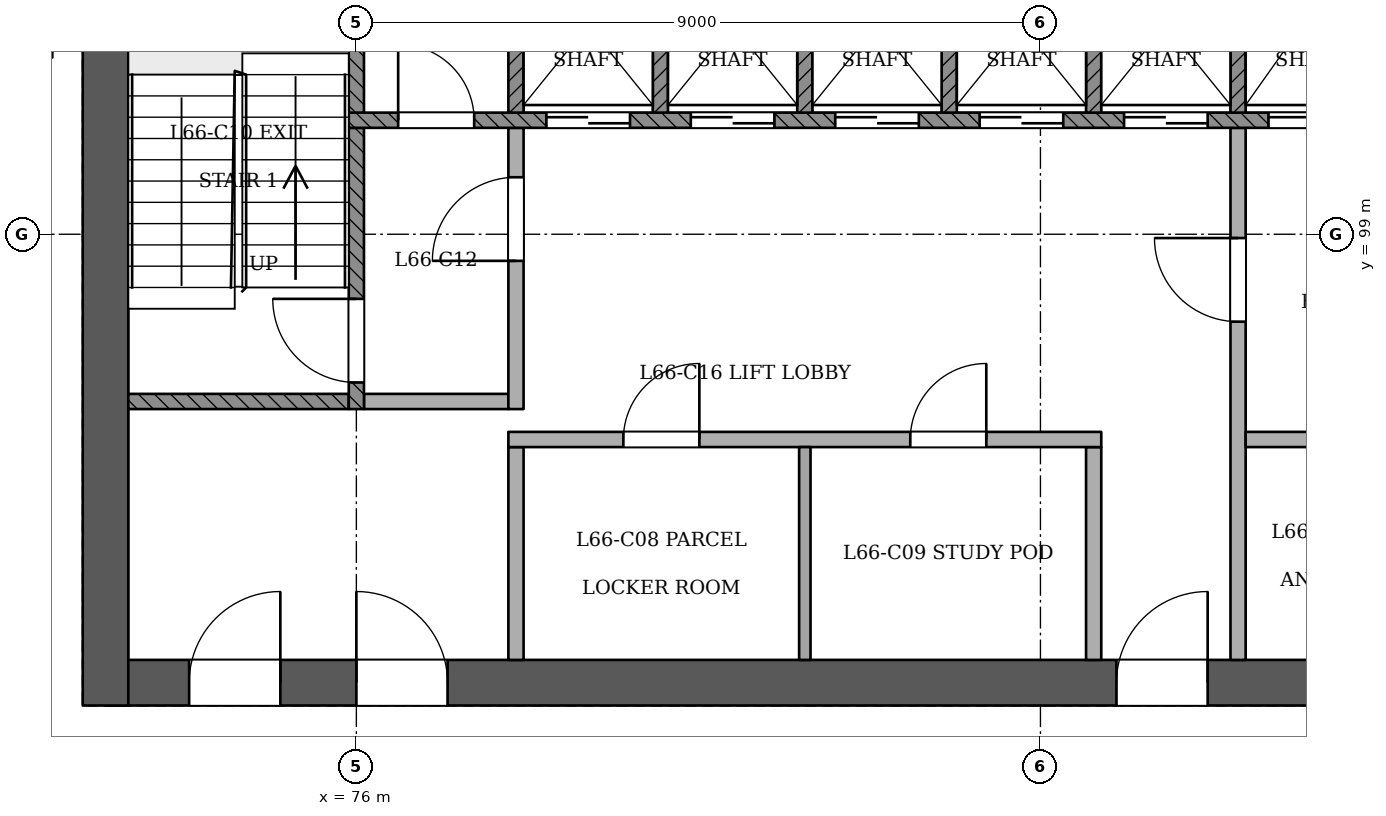
"""IFC4 building model, lengths in metres.
Left out: names, types, materials, properties, quantities, classifications, styles, units other than length and angle.
Written with IfcOpenShell. Run it as: python <this file> out.ifc"""

import sys

from ifc_helpers import new_model, si_unit, direction, frame, frame_2d, origin, place, context, subcontext, project, spatial, rectangle, extrude, element, fill, save


model = new_model("IFC4")
c1 = context("Model", 3, precision=1e-05, world=origin(), true_north=direction((0.0, 1.0)))
c2 = subcontext(c1, "Body", "Model", "MODEL_VIEW")
j1 = project(units=[si_unit("LENGTHUNIT", "METRE"), si_unit("PLANEANGLEUNIT", "RADIAN")], contexts=[c1])
p1 = place(None, origin())
s1 = spatial("IfcSite", under=j1, at=p1, CompositionType="ELEMENT")
p2 = place(p1, origin())
s2 = spatial("IfcBuilding", under=s1, at=p2, CompositionType="ELEMENT")
p3 = place(p2, frame((0.0, 0.0, 257.2)))
s3 = spatial("IfcBuildingStorey", under=s2, at=p3, CompositionType="ELEMENT", Elevation=257.2)
p4 = place(p3, frame((72.7, 93.1, 0.0), z_axis=(0.0, 0.0, 1.0), x_axis=(1.0, 0.0, 0.0)))
e1 = element("IfcWall", 1, at=p4, inside=s3, PredefinedType="SHEAR", context=c2, shape_type="SweptSolid", body=[
    extrude(rectangle(XDim=24.9, YDim=0.6, at=frame_2d((12.45, 0.0))), origin(), (0.0, 0.0, 1.0), 3.6),
])
p5 = place(p4, frame((1.1, 0.0, 0.0)))
e2 = element("IfcOpeningElement", 2, at=p5, cuts=e1, PredefinedType="OPENING", context=c2, shape_type="SweptSolid", body=[
    extrude(rectangle(XDim=1.2, YDim=2.1, at=frame_2d((0.6, 1.05))), frame((0.0, 0.311, 0.0), z_axis=(0.0, -1.0, 0.0), x_axis=(1.0, 0.0, 0.0)), (0.0, 0.0, 1.0), 0.621),
])
p6 = place(p4, frame((3.3, 0.0, 0.0)))
e3 = element("IfcOpeningElement", 3, at=p6, cuts=e1, PredefinedType="OPENING", context=c2, shape_type="SweptSolid", body=[
    extrude(rectangle(XDim=1.2, YDim=2.1, at=frame_2d((0.6, 1.05))), frame((0.0, 0.311, 0.0), z_axis=(0.0, -1.0, 0.0), x_axis=(1.0, 0.0, 0.0)), (0.0, 0.0, 1.0), 0.621),
])
p7 = place(p4, frame((13.3, 0.0, 0.0)))
e4 = element("IfcOpeningElement", 4, at=p7, cuts=e1, PredefinedType="OPENING", context=c2, shape_type="SweptSolid", body=[
    extrude(rectangle(XDim=1.2, YDim=2.1, at=frame_2d((0.6, 1.05))), frame((0.0, 0.311, 0.0), z_axis=(0.0, -1.0, 0.0), x_axis=(1.0, 0.0, 0.0)), (0.0, 0.0, 1.0), 0.621),
])
p8 = place(p4, frame((15.962, 0.0, 0.0)))
e5 = element("IfcOpeningElement", 5, at=p8, cuts=e1, PredefinedType="OPENING", context=c2, shape_type="SweptSolid", body=[
    extrude(rectangle(XDim=1.0, YDim=2.1, at=frame_2d((0.5, 1.05))), frame((0.0, 0.311, 0.0), z_axis=(0.0, -1.0, 0.0), x_axis=(1.0, 0.0, 0.0)), (0.0, 0.0, 1.0), 0.621),
])
p9 = place(p4, frame((18.75, 0.0, 0.0)))
e6 = element("IfcOpeningElement", 6, at=p9, cuts=e1, PredefinedType="OPENING", context=c2, shape_type="SweptSolid", body=[
    extrude(rectangle(XDim=1.0, YDim=2.1, at=frame_2d((0.5, 1.05))), frame((0.0, 0.311, 0.0), z_axis=(0.0, -1.0, 0.0), x_axis=(1.0, 0.0, 0.0)), (0.0, 0.0, 1.0), 0.621),
])
p10 = place(p4, frame((21.938, 0.0, 0.0)))
e7 = element("IfcOpeningElement", 7, at=p10, cuts=e1, PredefinedType="OPENING", context=c2, shape_type="SweptSolid", body=[
    extrude(rectangle(XDim=1.0, YDim=2.1, at=frame_2d((0.5, 1.05))), frame((0.0, 0.311, 0.0), z_axis=(0.0, -1.0, 0.0), x_axis=(1.0, 0.0, 0.0)), (0.0, 0.0, 1.0), 0.621),
])
p11 = place(p3, frame((72.7, 103.7, 0.0), z_axis=(0.0, 0.0, 1.0), x_axis=(0.0, -1.0, 0.0)))
e8 = element("IfcWall", 8, at=p11, inside=s3, PredefinedType="SHEAR", context=c2, shape_type="SweptSolid", body=[
    extrude(rectangle(XDim=10.9, YDim=0.6, at=frame_2d((5.45, 0.0))), origin(), (0.0, 0.0, 1.0), 3.6),
])
p12 = place(p3, frame((72.0, 101.4, 0.0), z_axis=(0.0, 0.0, 1.0), x_axis=(-1.0, 0.0, 0.0)))
e9 = element("IfcWall", 9, at=p12, inside=s3, PredefinedType="PARTITIONING", context=c2, shape_type="SweptSolid", body=[
    extrude(rectangle(XDim=1.8, YDim=0.15, at=frame_2d((0.9, 0.0))), origin(), (0.0, 0.0, 1.0), 3.2),
])
p13 = place(p12, frame((0.496, 0.0, 0.0)))
e10 = element("IfcOpeningElement", 10, at=p13, cuts=e9, PredefinedType="OPENING", context=c2, shape_type="SweptSolid", body=[
    extrude(rectangle(XDim=1.0, YDim=2.1, at=frame_2d((0.5, 1.05))), frame((0.0, 0.085, 0.0), z_axis=(0.0, -1.0, 0.0), x_axis=(1.0, 0.0, 0.0)), (0.0, 0.0, 1.0), 0.171),
])
p14 = place(p3, frame((78.1, 93.4, 0.0), z_axis=(0.0, 0.0, 1.0), x_axis=(0.0, 1.0, 0.0)))
e11 = element("IfcWall", 11, at=p14, inside=s3, PredefinedType="PARTITIONING", context=c2, shape_type="SweptSolid", body=[
    extrude(rectangle(XDim=2.8, YDim=0.2, at=frame_2d((1.4, 0.0))), origin(), (0.0, 0.0, 1.0), 3.2),
])
p15 = place(p3, frame((81.9, 93.4, 0.0), z_axis=(0.0, 0.0, 1.0), x_axis=(0.0, 1.0, 0.0)))
e12 = element("IfcWall", 12, at=p15, inside=s3, PredefinedType="PARTITIONING", context=c2, shape_type="SweptSolid", body=[
    extrude(rectangle(XDim=2.8, YDim=0.15, at=frame_2d((1.4, 0.0))), origin(), (0.0, 0.0, 1.0), 3.2),
])
p16 = place(p3, frame((85.7, 93.4, 0.0), z_axis=(0.0, 0.0, 1.0), x_axis=(0.0, 1.0, 0.0)))
e13 = element("IfcWall", 13, at=p16, inside=s3, PredefinedType="PARTITIONING", context=c2, shape_type="SweptSolid", body=[
    extrude(rectangle(XDim=2.8, YDim=0.2, at=frame_2d((1.4, 0.0))), origin(), (0.0, 0.0, 1.0), 3.2),
])
p17 = place(p3, frame((87.6, 93.4, 0.0), z_axis=(0.0, 0.0, 1.0), x_axis=(0.0, 1.0, 0.0)))
e14 = element("IfcWall", 14, at=p17, inside=s3, PredefinedType="PARTITIONING", context=c2, shape_type="SweptSolid", body=[
    extrude(rectangle(XDim=7.0, YDim=0.2, at=frame_2d((3.5, 0.0))), origin(), (0.0, 0.0, 1.0), 3.2),
])
p18 = place(p17, frame((4.45, 0.0, 0.0)))
e15 = element("IfcOpeningElement", 15, at=p18, cuts=e14, PredefinedType="OPENING", context=c2, shape_type="SweptSolid", body=[
    extrude(rectangle(XDim=1.1, YDim=2.1, at=frame_2d((0.55, 1.05))), frame((0.0, 0.11, 0.0), z_axis=(0.0, -1.0, 0.0), x_axis=(1.0, 0.0, 0.0)), (0.0, 0.0, 1.0), 0.221),
])
p19 = place(p3, frame((78.0, 96.3, 0.0), z_axis=(0.0, 0.0, 1.0), x_axis=(1.0, 0.0, 0.0)))
e16 = element("IfcWall", 16, at=p19, inside=s3, PredefinedType="PARTITIONING", context=c2, shape_type="SweptSolid", body=[
    extrude(rectangle(XDim=7.8, YDim=0.2, at=frame_2d((3.9, 0.0))), origin(), (0.0, 0.0, 1.0), 3.2),
])
p20 = place(p19, frame((1.512, 0.0, 0.0)))
e17 = element("IfcOpeningElement", 17, at=p20, cuts=e16, PredefinedType="OPENING", context=c2, shape_type="SweptSolid", body=[
    extrude(rectangle(XDim=1.0, YDim=2.1, at=frame_2d((0.5, 1.05))), frame((0.0, 0.11, 0.0), z_axis=(0.0, -1.0, 0.0), x_axis=(1.0, 0.0, 0.0)), (0.0, 0.0, 1.0), 0.221),
])
p21 = place(p19, frame((5.288, 0.0, 0.0)))
e18 = element("IfcOpeningElement", 18, at=p21, cuts=e16, PredefinedType="OPENING", context=c2, shape_type="SweptSolid", body=[
    extrude(rectangle(XDim=1.0, YDim=2.1, at=frame_2d((0.5, 1.05))), frame((0.0, 0.11, 0.0), z_axis=(0.0, -1.0, 0.0), x_axis=(1.0, 0.0, 0.0)), (0.0, 0.0, 1.0), 0.221),
])
p22 = place(p3, frame((87.7, 96.3, 0.0), z_axis=(0.0, 0.0, 1.0), x_axis=(1.0, 0.0, 0.0)))
e19 = element("IfcWall", 19, at=p22, inside=s3, PredefinedType="PARTITIONING", context=c2, shape_type="SweptSolid", body=[
    extrude(rectangle(XDim=3.6, YDim=0.2, at=frame_2d((1.8, 0.0))), origin(), (0.0, 0.0, 1.0), 3.2),
])
p23 = place(p3, frame((73.0, 96.8, 0.0), z_axis=(0.0, 0.0, 1.0), x_axis=(1.0, 0.0, 0.0)))
e20 = element("IfcWall", 20, at=p23, inside=s3, PredefinedType="SOLIDWALL", context=c2, shape_type="SweptSolid", body=[
    extrude(rectangle(XDim=2.9, YDim=0.2, at=frame_2d((1.45, 0.0))), origin(), (0.0, 0.0, 1.0), 3.2),
])
p24 = place(p3, frame((76.0, 96.7, 0.0), z_axis=(0.0, 0.0, 1.0), x_axis=(0.0, 1.0, 0.0)))
e21 = element("IfcWall", 21, at=p24, inside=s3, PredefinedType="SOLIDWALL", context=c2, shape_type="SweptSolid", body=[
    extrude(rectangle(XDim=3.7, YDim=0.2, at=frame_2d((1.85, 0.0))), origin(), (0.0, 0.0, 1.0), 3.2),
])
p25 = place(p24, frame((0.35, 0.0, 0.0)))
e22 = element("IfcOpeningElement", 22, at=p25, cuts=e21, PredefinedType="OPENING", context=c2, shape_type="SweptSolid", body=[
    extrude(rectangle(XDim=1.1, YDim=2.1, at=frame_2d((0.55, 1.05))), frame((0.0, 0.11, 0.0), z_axis=(0.0, -1.0, 0.0), x_axis=(1.0, 0.0, 0.0)), (0.0, 0.0, 1.0), 0.221),
])
p26 = place(p3, frame((76.1, 96.8, 0.0), z_axis=(0.0, 0.0, 1.0), x_axis=(1.0, 0.0, 0.0)))
e23 = element("IfcWall", 23, at=p26, inside=s3, PredefinedType="PARTITIONING", context=c2, shape_type="SweptSolid", body=[
    extrude(rectangle(XDim=1.9, YDim=0.2, at=frame_2d((0.95, 0.0))), origin(), (0.0, 0.0, 1.0), 3.2),
])
p27 = place(p3, frame((78.1, 96.7, 0.0), z_axis=(0.0, 0.0, 1.0), x_axis=(0.0, 1.0, 0.0)))
e24 = element("IfcWall", 24, at=p27, inside=s3, PredefinedType="PARTITIONING", context=c2, shape_type="SweptSolid", body=[
    extrude(rectangle(XDim=3.7, YDim=0.2, at=frame_2d((1.85, 0.0))), origin(), (0.0, 0.0, 1.0), 3.2),
])
p28 = place(p27, frame((1.95, 0.0, 0.0)))
e25 = element("IfcOpeningElement", 25, at=p28, cuts=e24, PredefinedType="OPENING", context=c2, shape_type="SweptSolid", body=[
    extrude(rectangle(XDim=1.1, YDim=2.1, at=frame_2d((0.55, 1.05))), frame((0.0, 0.11, 0.0), z_axis=(0.0, -1.0, 0.0), x_axis=(1.0, 0.0, 0.0)), (0.0, 0.0, 1.0), 0.221),
])
p29 = place(p3, frame((75.9, 100.5, 0.0), z_axis=(0.0, 0.0, 1.0), x_axis=(1.0, 0.0, 0.0)))
e26 = element("IfcWall", 26, at=p29, inside=s3, PredefinedType="SOLIDWALL", context=c2, shape_type="SweptSolid", body=[
    extrude(rectangle(XDim=18.2, YDim=0.2, at=frame_2d((9.1, 0.0))), origin(), (0.0, 0.0, 1.0), 3.2),
])
p30 = place(p29, frame((2.6, 0.0, 0.0)))
e27 = element("IfcOpeningElement", 27, at=p30, cuts=e26, PredefinedType="OPENING", context=c2, shape_type="SweptSolid", body=[
    extrude(rectangle(XDim=1.1, YDim=2.1, at=frame_2d((0.55, 1.05))), frame((0.0, 0.11, 0.0), z_axis=(0.0, -1.0, 0.0), x_axis=(1.0, 0.0, 0.0)), (0.0, 0.0, 1.0), 0.221),
])
p31 = place(p29, frame((4.5, 0.0, 0.0)))
e28 = element("IfcOpeningElement", 28, at=p31, cuts=e26, PredefinedType="OPENING", context=c2, shape_type="SweptSolid", body=[
    extrude(rectangle(XDim=1.1, YDim=2.1, at=frame_2d((0.55, 1.05))), frame((0.0, 0.11, 0.0), z_axis=(0.0, -1.0, 0.0), x_axis=(1.0, 0.0, 0.0)), (0.0, 0.0, 1.0), 0.221),
])
p32 = place(p29, frame((6.4, 0.0, 0.0)))
e29 = element("IfcOpeningElement", 29, at=p32, cuts=e26, PredefinedType="OPENING", context=c2, shape_type="SweptSolid", body=[
    extrude(rectangle(XDim=1.1, YDim=2.1, at=frame_2d((0.55, 1.05))), frame((0.0, 0.11, 0.0), z_axis=(0.0, -1.0, 0.0), x_axis=(1.0, 0.0, 0.0)), (0.0, 0.0, 1.0), 0.221),
])
p33 = place(p29, frame((8.3, 0.0, 0.0)))
e30 = element("IfcOpeningElement", 30, at=p33, cuts=e26, PredefinedType="OPENING", context=c2, shape_type="SweptSolid", body=[
    extrude(rectangle(XDim=1.1, YDim=2.1, at=frame_2d((0.55, 1.05))), frame((0.0, 0.11, 0.0), z_axis=(0.0, -1.0, 0.0), x_axis=(1.0, 0.0, 0.0)), (0.0, 0.0, 1.0), 0.221),
])
p34 = place(p29, frame((10.2, 0.0, 0.0)))
e31 = element("IfcOpeningElement", 31, at=p34, cuts=e26, PredefinedType="OPENING", context=c2, shape_type="SweptSolid", body=[
    extrude(rectangle(XDim=1.1, YDim=2.1, at=frame_2d((0.55, 1.05))), frame((0.0, 0.11, 0.0), z_axis=(0.0, -1.0, 0.0), x_axis=(1.0, 0.0, 0.0)), (0.0, 0.0, 1.0), 0.221),
])
p35 = place(p29, frame((12.1, 0.0, 0.0)))
e32 = element("IfcOpeningElement", 32, at=p35, cuts=e26, PredefinedType="OPENING", context=c2, shape_type="SweptSolid", body=[
    extrude(rectangle(XDim=1.1, YDim=2.1, at=frame_2d((0.55, 1.05))), frame((0.0, 0.11, 0.0), z_axis=(0.0, -1.0, 0.0), x_axis=(1.0, 0.0, 0.0)), (0.0, 0.0, 1.0), 0.221),
])
p36 = place(p29, frame((14.0, 0.0, 0.0)))
e33 = element("IfcOpeningElement", 33, at=p36, cuts=e26, PredefinedType="OPENING", context=c2, shape_type="SweptSolid", body=[
    extrude(rectangle(XDim=1.1, YDim=2.1, at=frame_2d((0.55, 1.05))), frame((0.0, 0.11, 0.0), z_axis=(0.0, -1.0, 0.0), x_axis=(1.0, 0.0, 0.0)), (0.0, 0.0, 1.0), 0.221),
])
p37 = place(p29, frame((0.65, 0.0, 0.0)))
e34 = element("IfcOpeningElement", 34, at=p37, cuts=e26, PredefinedType="OPENING", context=c2, shape_type="SweptSolid", body=[
    extrude(rectangle(XDim=1.0, YDim=2.1, at=frame_2d((0.5, 1.05))), frame((0.0, 0.11, 0.0), z_axis=(0.0, -1.0, 0.0), x_axis=(1.0, 0.0, 0.0)), (0.0, 0.0, 1.0), 0.221),
])
p38 = place(p29, frame((16.3, 0.0, 0.0)))
e35 = element("IfcOpeningElement", 35, at=p38, cuts=e26, PredefinedType="OPENING", context=c2, shape_type="SweptSolid", body=[
    extrude(rectangle(XDim=1.0, YDim=2.1, at=frame_2d((0.5, 1.05))), frame((0.0, 0.11, 0.0), z_axis=(0.0, -1.0, 0.0), x_axis=(1.0, 0.0, 0.0)), (0.0, 0.0, 1.0), 0.221),
])
for number, where, z_axis, x_axis in (
    (36, (76.0, 100.6, 0.0), (0.0, 0.0, 1.0), (0.0, 1.0, 0.0)),
    (37, (78.1, 100.6, 0.0), (0.0, 0.0, 1.0), (0.0, 1.0, 0.0)),
    (38, (80.0, 100.6, 0.0), (0.0, 0.0, 1.0), (0.0, 1.0, 0.0)),
    (39, (81.9, 100.6, 0.0), (0.0, 0.0, 1.0), (0.0, 1.0, 0.0)),
    (40, (83.8, 100.6, 0.0), (0.0, 0.0, 1.0), (0.0, 1.0, 0.0)),
    (41, (85.7, 100.6, 0.0), (0.0, 0.0, 1.0), (0.0, 1.0, 0.0)),
    (42, (87.6, 100.6, 0.0), (0.0, 0.0, 1.0), (0.0, 1.0, 0.0)),
):
    element("IfcWall", number, at=place(p3, frame(where, z_axis=z_axis, x_axis=x_axis)), inside=s3, PredefinedType="SOLIDWALL", context=c2, shape_type="SweptSolid", body=[
        extrude(rectangle(XDim=2.8, YDim=0.2, at=frame_2d((1.4, 0.0))), origin(), (0.0, 0.0, 1.0), 3.2),
    ])
p39 = place(p30, origin())
e43 = element("IfcDoor", 43, at=p39, inside=s3, OperationType="SLIDING_TO_RIGHT", PredefinedType="NOTDEFINED", context=c2, shape_type="SweptSolid", body=[
    extrude(rectangle(XDim=1.1, YDim=2.1, at=frame_2d((0.55, 1.05))), frame((0.0, 0.025, 0.0), z_axis=(0.0, -1.0, 0.0), x_axis=(1.0, 0.0, 0.0)), (0.0, 0.0, 1.0), 0.05),
])
fill(e27, e43)
p40 = place(p31, origin())
e44 = element("IfcDoor", 44, at=p40, inside=s3, OperationType="SLIDING_TO_LEFT", PredefinedType="NOTDEFINED", context=c2, shape_type="SweptSolid", body=[
    extrude(rectangle(XDim=1.1, YDim=2.1, at=frame_2d((0.55, 1.05))), frame((0.0, 0.025, 0.0), z_axis=(0.0, -1.0, 0.0), x_axis=(1.0, 0.0, 0.0)), (0.0, 0.0, 1.0), 0.05),
])
fill(e28, e44)
p41 = place(p32, origin())
e45 = element("IfcDoor", 45, at=p41, inside=s3, OperationType="SLIDING_TO_RIGHT", PredefinedType="NOTDEFINED", context=c2, shape_type="SweptSolid", body=[
    extrude(rectangle(XDim=1.1, YDim=2.1, at=frame_2d((0.55, 1.05))), frame((0.0, 0.025, 0.0), z_axis=(0.0, -1.0, 0.0), x_axis=(1.0, 0.0, 0.0)), (0.0, 0.0, 1.0), 0.05),
])
fill(e29, e45)
p42 = place(p33, origin())
e46 = element("IfcDoor", 46, at=p42, inside=s3, OperationType="SLIDING_TO_LEFT", PredefinedType="NOTDEFINED", context=c2, shape_type="SweptSolid", body=[
    extrude(rectangle(XDim=1.1, YDim=2.1, at=frame_2d((0.55, 1.05))), frame((0.0, 0.025, 0.0), z_axis=(0.0, -1.0, 0.0), x_axis=(1.0, 0.0, 0.0)), (0.0, 0.0, 1.0), 0.05),
])
fill(e30, e46)
p43 = place(p34, origin())
e47 = element("IfcDoor", 47, at=p43, inside=s3, OperationType="SLIDING_TO_RIGHT", PredefinedType="NOTDEFINED", context=c2, shape_type="SweptSolid", body=[
    extrude(rectangle(XDim=1.1, YDim=2.1, at=frame_2d((0.55, 1.05))), frame((0.0, 0.025, 0.0), z_axis=(0.0, -1.0, 0.0), x_axis=(1.0, 0.0, 0.0)), (0.0, 0.0, 1.0), 0.05),
])
fill(e31, e47)
p44 = place(p35, origin())
e48 = element("IfcDoor", 48, at=p44, inside=s3, OperationType="SLIDING_TO_RIGHT", PredefinedType="NOTDEFINED", context=c2, shape_type="SweptSolid", body=[
    extrude(rectangle(XDim=1.1, YDim=2.1, at=frame_2d((0.55, 1.05))), frame((0.0, 0.025, 0.0), z_axis=(0.0, -1.0, 0.0), x_axis=(1.0, 0.0, 0.0)), (0.0, 0.0, 1.0), 0.05),
])
fill(e32, e48)
p45 = place(p25, origin())
e49 = element("IfcDoor", 49, at=p45, inside=s3, OperationType="SINGLE_SWING_RIGHT", PredefinedType="NOTDEFINED", context=c2, shape_type="SweptSolid", body=[
    extrude(rectangle(XDim=1.1, YDim=2.1, at=frame_2d((0.55, 1.05))), frame((0.0, 0.025, 0.0), z_axis=(0.0, -1.0, 0.0), x_axis=(1.0, 0.0, 0.0)), (0.0, 0.0, 1.0), 0.05),
])
fill(e22, e49)
p46 = place(p28, origin())
e50 = element("IfcDoor", 50, at=p46, inside=s3, OperationType="SINGLE_SWING_LEFT", PredefinedType="NOTDEFINED", context=c2, shape_type="SweptSolid", body=[
    extrude(rectangle(XDim=1.1, YDim=2.1, at=frame_2d((0.55, 1.05))), frame((0.0, 0.025, 0.0), z_axis=(0.0, -1.0, 0.0), x_axis=(1.0, 0.0, 0.0)), (0.0, 0.0, 1.0), 0.05),
])
fill(e25, e50)
p47 = place(p18, origin())
e51 = element("IfcDoor", 51, at=p47, inside=s3, OperationType="SINGLE_SWING_RIGHT", PredefinedType="NOTDEFINED", context=c2, shape_type="SweptSolid", body=[
    extrude(rectangle(XDim=1.1, YDim=2.1, at=frame_2d((0.55, 1.05))), frame((0.0, 0.025, 0.0), z_axis=(0.0, -1.0, 0.0), x_axis=(1.0, 0.0, 0.0)), (0.0, 0.0, 1.0), 0.05),
])
fill(e15, e51)
p48 = place(p5, origin())
e52 = element("IfcDoor", 52, at=p48, inside=s3, OperationType="SINGLE_SWING_RIGHT", PredefinedType="NOTDEFINED", context=c2, shape_type="SweptSolid", body=[
    extrude(rectangle(XDim=1.2, YDim=2.1, at=frame_2d((0.6, 1.05))), frame((0.0, 0.025, 0.0), z_axis=(0.0, -1.0, 0.0), x_axis=(1.0, 0.0, 0.0)), (0.0, 0.0, 1.0), 0.05),
])
fill(e2, e52)
p49 = place(p6, origin())
e53 = element("IfcDoor", 53, at=p49, inside=s3, OperationType="SINGLE_SWING_LEFT", PredefinedType="NOTDEFINED", context=c2, shape_type="SweptSolid", body=[
    extrude(rectangle(XDim=1.2, YDim=2.1, at=frame_2d((0.6, 1.05))), frame((0.0, 0.025, 0.0), z_axis=(0.0, -1.0, 0.0), x_axis=(1.0, 0.0, 0.0)), (0.0, 0.0, 1.0), 0.05),
])
fill(e3, e53)
p50 = place(p7, origin())
e54 = element("IfcDoor", 54, at=p50, inside=s3, OperationType="SINGLE_SWING_RIGHT", PredefinedType="NOTDEFINED", context=c2, shape_type="SweptSolid", body=[
    extrude(rectangle(XDim=1.2, YDim=2.1, at=frame_2d((0.6, 1.05))), frame((0.0, 0.025, 0.0), z_axis=(0.0, -1.0, 0.0), x_axis=(1.0, 0.0, 0.0)), (0.0, 0.0, 1.0), 0.05),
])
fill(e4, e54)
p51 = place(p37, origin())
e55 = element("IfcDoor", 55, at=p51, inside=s3, OperationType="SINGLE_SWING_LEFT", PredefinedType="NOTDEFINED", context=c2, shape_type="SweptSolid", body=[
    extrude(rectangle(XDim=1.0, YDim=2.1, at=frame_2d((0.5, 1.05))), frame((0.0, 0.025, 0.0), z_axis=(0.0, -1.0, 0.0), x_axis=(1.0, 0.0, 0.0)), (0.0, 0.0, 1.0), 0.05),
])
fill(e34, e55)
p52 = place(p20, origin())
e56 = element("IfcDoor", 56, at=p52, inside=s3, OperationType="SINGLE_SWING_RIGHT", PredefinedType="NOTDEFINED", context=c2, shape_type="SweptSolid", body=[
    extrude(rectangle(XDim=1.0, YDim=2.1, at=frame_2d((0.5, 1.05))), frame((0.0, 0.025, 0.0), z_axis=(0.0, -1.0, 0.0), x_axis=(1.0, 0.0, 0.0)), (0.0, 0.0, 1.0), 0.05),
])
fill(e17, e56)
p53 = place(p21, origin())
e57 = element("IfcDoor", 57, at=p53, inside=s3, OperationType="SINGLE_SWING_RIGHT", PredefinedType="NOTDEFINED", context=c2, shape_type="SweptSolid", body=[
    extrude(rectangle(XDim=1.0, YDim=2.1, at=frame_2d((0.5, 1.05))), frame((0.0, 0.025, 0.0), z_axis=(0.0, -1.0, 0.0), x_axis=(1.0, 0.0, 0.0)), (0.0, 0.0, 1.0), 0.05),
])
fill(e18, e57)
save(model, sys.argv[1])
